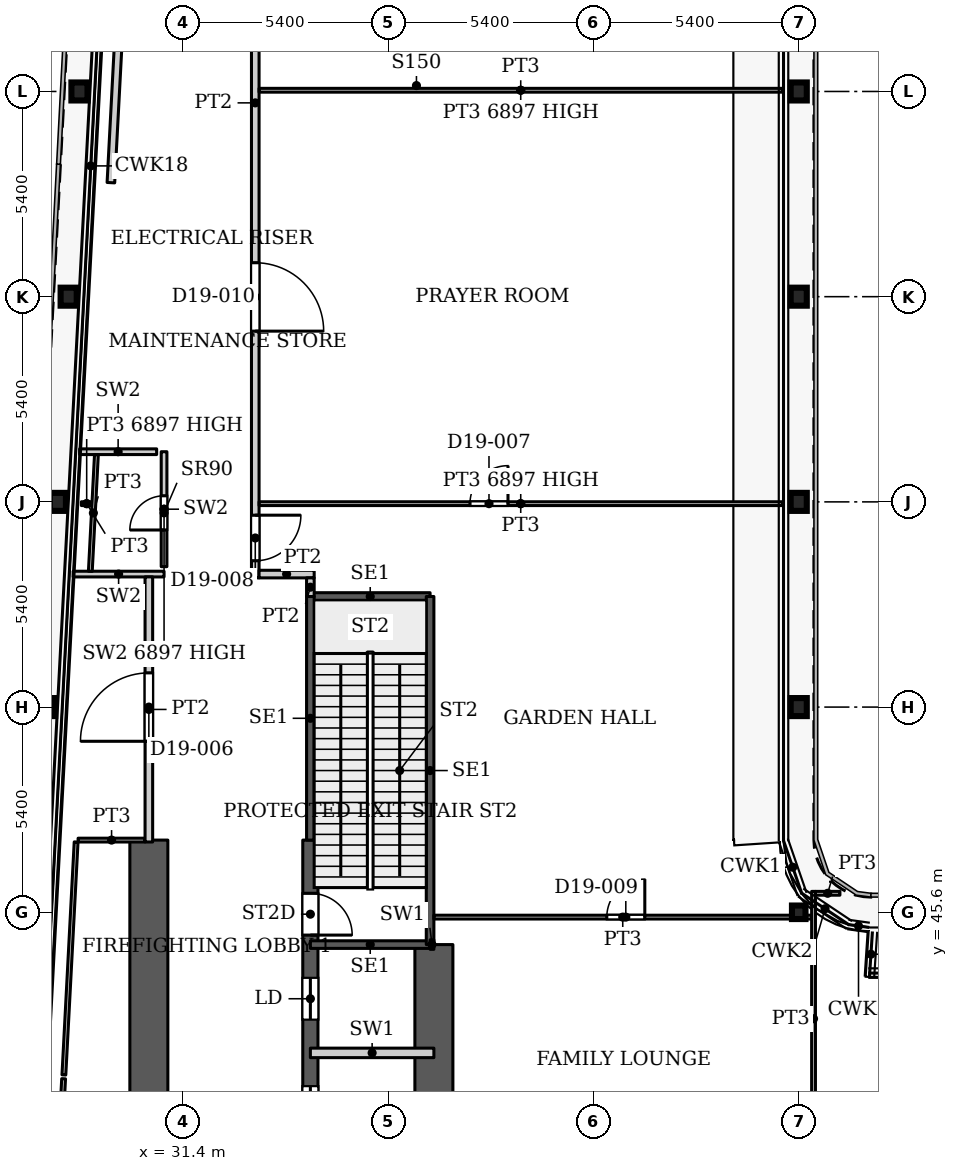
"""IFC4 building model, lengths in metres.
Left out: names, types, materials, properties, quantities, classifications, styles, units other than length and angle.
Written with IfcOpenShell. Run it as: python <this file> out.ifc"""

import sys

from ifc_helpers import new_model, si_unit, direction, frame, frame_2d, origin, origin_2d, place, context, subcontext, project, spatial, rectangle, hollow_rectangle, i_section, extrude, source, transform, mapped, element, fill, save


model = new_model("IFC4")
c1 = context("Model", 3, precision=1e-05, world=origin(), true_north=direction((0.0, 1.0)))
c2 = subcontext(c1, "Body", "Model", "MODEL_VIEW")
j1 = project(units=[si_unit("LENGTHUNIT", "METRE"), si_unit("PLANEANGLEUNIT", "RADIAN")], contexts=[c1])
p1 = place(None, origin())
s1 = spatial("IfcSite", under=j1, at=p1, CompositionType="ELEMENT")
p2 = place(p1, origin())
s2 = spatial("IfcBuilding", under=s1, at=p2, CompositionType="ELEMENT")
p3 = place(p2, frame((0.0, 0.0, 81.2)))
s3 = spatial("IfcBuildingStorey", under=s2, at=p3, CompositionType="ELEMENT", Elevation=81.2)
for number, where, z_axis, x_axis in (
    (1, (27.822, 51.0, 0.0), (0.0, 0.0, 1.0), (1.0, 0.0, 0.0)),
    (2, (47.6, 51.0, 0.0), (0.0, 0.0, 1.0), (1.0, 0.0, 0.0)),
    (3, (28.106, 56.4, 0.0), (0.0, 0.0, 1.0), (1.0, 0.0, 0.0)),
    (4, (47.6, 56.4, 0.0), (0.0, 0.0, 1.0), (1.0, 0.0, 0.0)),
    (5, (28.39, 61.8, 0.0), (0.0, 0.0, 1.0), (1.0, 0.0, 0.0)),
    (6, (47.6, 61.8, 0.0), (0.0, 0.0, 1.0), (1.0, 0.0, 0.0)),
    (7, (28.674, 67.2, 0.0), (0.0, 0.0, 1.0), (1.0, 0.0, 0.0)),
    (8, (47.6, 67.2, 0.0), (0.0, 0.0, 1.0), (1.0, 0.0, 0.0)),
):
    element("IfcColumn", number, at=place(p3, frame(where, z_axis=z_axis, x_axis=x_axis)), inside=s3, PredefinedType="COLUMN", context=c2, shape_type="SweptSolid", body=[
        extrude(i_section(OverallWidth=0.424, OverallDepth=0.474, WebThickness=0.048, FlangeThickness=0.077, FilletRadius=0.014, at=origin_2d()), origin(), (0.0, 0.0, 1.0), 7.8),
    ])
p4 = place(p3, frame((47.6, 45.6, 0.0), z_axis=(0.0, 0.0, 1.0), x_axis=(1.0, 0.0, 0.0)))
e9 = element("IfcColumn", 9, at=p4, inside=s3, PredefinedType="COLUMN", context=c2, shape_type="SweptSolid", body=[
    extrude(hollow_rectangle(XDim=0.356, YDim=0.356, WallThickness=0.016, InnerFilletRadius=0.016, OuterFilletRadius=0.032, at=origin_2d()), origin(), (0.0, 0.0, 1.0), 7.8),
])
p5 = place(p3, frame((34.75, 29.05, 0.0), z_axis=(0.0, 0.0, 1.0), x_axis=(0.0, 1.0, 0.0)))
e10 = element("IfcWall", 10, at=p5, inside=s3, PredefinedType="SHEAR", context=c2, shape_type="SweptSolid", body=[
    extrude(rectangle(XDim=18.45, YDim=0.4, at=frame_2d((9.225, 0.0))), origin(), (0.0, 0.0, 1.0), 7.8),
])
p6 = place(p5, frame((8.025, 0.0, 0.0)))
e11 = element("IfcOpeningElement", 11, at=p6, cuts=e10, PredefinedType="OPENING", context=c2, shape_type="SweptSolid", body=[
    extrude(rectangle(XDim=1.1, YDim=2.2, at=frame_2d((0.55, 1.1))), frame((0.0, 0.21, 0.0), z_axis=(0.0, -1.0, 0.0), x_axis=(1.0, 0.0, 0.0)), (0.0, 0.0, 1.0), 0.42),
])
p7 = place(p5, frame((10.875, 0.0, 0.0)))
e12 = element("IfcOpeningElement", 12, at=p7, cuts=e10, PredefinedType="OPENING", context=c2, shape_type="SweptSolid", body=[
    extrude(rectangle(XDim=1.1, YDim=2.2, at=frame_2d((0.55, 1.1))), frame((0.0, 0.21, 0.0), z_axis=(0.0, -1.0, 0.0), x_axis=(1.0, 0.0, 0.0)), (0.0, 0.0, 1.0), 0.42),
])
p8 = place(p5, frame((13.725, 0.0, 0.0)))
e13 = element("IfcOpeningElement", 13, at=p8, cuts=e10, PredefinedType="OPENING", context=c2, shape_type="SweptSolid", body=[
    extrude(rectangle(XDim=1.1, YDim=2.2, at=frame_2d((0.55, 1.1))), frame((0.0, 0.21, 0.0), z_axis=(0.0, -1.0, 0.0), x_axis=(1.0, 0.0, 0.0)), (0.0, 0.0, 1.0), 0.42),
])
p9 = place(p5, frame((15.95, 0.0, 0.0)))
e14 = element("IfcOpeningElement", 14, at=p9, cuts=e10, PredefinedType="OPENING", context=c2, shape_type="SweptSolid", body=[
    extrude(rectangle(XDim=1.1, YDim=2.2, at=frame_2d((0.55, 1.1))), frame((0.0, 0.21, 0.0), z_axis=(0.0, -1.0, 0.0), x_axis=(1.0, 0.0, 0.0)), (0.0, 0.0, 1.0), 0.42),
])
p10 = place(p3, frame((38.0, 36.2, 0.0), z_axis=(0.0, 0.0, 1.0), x_axis=(0.0, 1.0, 0.0)))
e15 = element("IfcWall", 15, at=p10, inside=s3, PredefinedType="SHEAR", context=c2, shape_type="SweptSolid", body=[
    extrude(rectangle(XDim=8.55, YDim=1.0, at=frame_2d((4.275, 0.0))), origin(), (0.0, 0.0, 1.0), 7.8),
])
p11 = place(p3, frame((30.5, 29.05, 0.0), z_axis=(0.0, 0.0, 1.0), x_axis=(0.0, 1.0, 0.0)))
e16 = element("IfcWall", 16, at=p11, inside=s3, PredefinedType="SHEAR", context=c2, shape_type="SweptSolid", body=[
    extrude(rectangle(XDim=18.45, YDim=1.0, at=frame_2d((9.225, 0.0))), origin(), (0.0, 0.0, 1.0), 7.8),
])
p12 = place(p11, frame((1.5, 0.0, 0.0)))
e17 = element("IfcOpeningElement", 17, at=p12, cuts=e16, PredefinedType="OPENING", context=c2, shape_type="SweptSolid", body=[
    extrude(rectangle(XDim=0.9, YDim=2.2, at=frame_2d((0.45, 1.1))), frame((0.0, 0.51, 0.0), z_axis=(0.0, -1.0, 0.0), x_axis=(1.0, 0.0, 0.0)), (0.0, 0.0, 1.0), 1.02),
])
p13 = place(p11, frame((8.146, 0.0, 0.0)))
e18 = element("IfcOpeningElement", 18, at=p13, cuts=e16, PredefinedType="OPENING", context=c2, shape_type="SweptSolid", body=[
    extrude(rectangle(XDim=0.9, YDim=2.2, at=frame_2d((0.45, 1.1))), frame((0.0, 0.51, 0.0), z_axis=(0.0, -1.0, 0.0), x_axis=(1.0, 0.0, 0.0)), (0.0, 0.0, 1.0), 1.02),
])
for number, where, z_axis, x_axis in (
    (19, (34.75, 44.75, 0.0), (0.0, 0.0, 1.0), (1.0, 0.0, 0.0)),
    (20, (34.75, 53.91, 0.0), (0.0, 0.0, 1.0), (1.0, 0.0, 0.0)),
):
    element("IfcWall", number, at=place(p3, frame(where, z_axis=z_axis, x_axis=x_axis)), inside=s3, PredefinedType="SHEAR", context=c2, shape_type="SweptSolid", body=[
        extrude(rectangle(XDim=3.15, YDim=0.2, at=frame_2d((1.575, 0.0))), origin(), (0.0, 0.0, 1.0), 7.8),
    ])
p14 = place(p3, frame((34.75, 47.5, 0.0), z_axis=(0.0, 0.0, 1.0), x_axis=(0.0, 1.0, 0.0)))
e21 = element("IfcWall", 21, at=p14, inside=s3, PredefinedType="SHEAR", context=c2, shape_type="SweptSolid", body=[
    extrude(rectangle(XDim=6.41, YDim=0.2, at=frame_2d((3.205, 0.0))), origin(), (0.0, 0.0, 1.0), 7.8),
])
p15 = place(p3, frame((37.9, 44.75, 0.0), z_axis=(0.0, 0.0, 1.0), x_axis=(0.0, 1.0, 0.0)))
e22 = element("IfcWall", 22, at=p15, inside=s3, PredefinedType="SHEAR", context=c2, shape_type="SweptSolid", body=[
    extrude(rectangle(XDim=9.16, YDim=0.2, at=frame_2d((4.58, 0.0))), origin(), (0.0, 0.0, 1.0), 7.8),
])
p16 = place(p3, frame((34.75, 41.9, 0.0), z_axis=(0.0, 0.0, 1.0), x_axis=(1.0, 0.0, 0.0)))
e23 = element("IfcWall", 23, at=p16, inside=s3, PredefinedType="PARTITIONING", context=c2, shape_type="SweptSolid", body=[
    extrude(rectangle(XDim=3.25, YDim=0.25, at=frame_2d((1.625, 0.0))), origin(), (0.0, 0.0, 1.0), 7.8),
])
p17 = place(p3, frame((37.9, 44.75, 0.0), z_axis=(0.0, 0.0, 1.0), x_axis=(1.0, 0.0, 0.0)))
e24 = element("IfcWall", 24, at=p17, inside=s3, PredefinedType="PARTITIONING", context=c2, shape_type="SweptSolid", body=[
    extrude(rectangle(XDim=0.1, YDim=0.25, at=frame_2d((0.05, 0.0))), origin(), (0.0, 0.0, 1.0), 7.8),
])
p18 = place(p3, frame((28.508, 54.5, 0.0), z_axis=(0.0, 0.0, 1.0), x_axis=(1.0, 0.0, 0.0)))
e25 = element("IfcWall", 25, at=p18, inside=s3, PredefinedType="PARTITIONING", context=c2, shape_type="SweptSolid", body=[
    extrude(rectangle(XDim=2.392, YDim=0.15, at=frame_2d((1.196, 0.0))), origin(), (0.0, 0.0, 1.0), 7.8),
])
p19 = place(p3, frame((30.9, 54.695, 0.0), z_axis=(0.0, 0.0, 1.0), x_axis=(0.0, 1.0, 0.0)))
e26 = element("IfcWall", 26, at=p19, inside=s3, PredefinedType="PARTITIONING", context=c2, shape_type="SweptSolid", body=[
    extrude(rectangle(XDim=3.025, YDim=0.15, at=frame_2d((1.512, 0.0))), origin(), (0.0, 0.0, 1.0), 6.897),
])
p20 = place(p19, frame((0.965, 0.0, 0.0)))
e27 = element("IfcOpeningElement", 27, at=p20, cuts=e26, PredefinedType="OPENING", context=c2, shape_type="SweptSolid", body=[
    extrude(rectangle(XDim=0.9, YDim=2.2, at=frame_2d((0.45, 1.1))), frame((0.0, 0.085, 0.0), z_axis=(0.0, -1.0, 0.0), x_axis=(1.0, 0.0, 0.0)), (0.0, 0.0, 1.0), 0.17),
])
p21 = place(p3, frame((28.678, 57.72, 0.0), z_axis=(0.0, 0.0, 1.0), x_axis=(1.0, 0.0, 0.0)))
e28 = element("IfcWall", 28, at=p21, inside=s3, PredefinedType="PARTITIONING", context=c2, shape_type="SweptSolid", body=[
    extrude(rectangle(XDim=2.027, YDim=0.15, at=frame_2d((1.014, 0.0))), origin(), (0.0, 0.0, 1.0), 7.8),
])
p22 = place(p3, frame((27.845, 33.393, 0.0), z_axis=(0.0, 0.0, 1.0), x_axis=(0.052580086943, 0.998616710484, 0.0)))
e29 = element("IfcWall", 29, at=p22, inside=s3, PredefinedType="PARTITIONING", context=c2, shape_type="SweptSolid", body=[
    extrude(rectangle(XDim=7.838, YDim=0.1, at=frame_2d((3.919, 0.0))), origin(), (0.0, 0.0, 1.0), 7.5),
])
p23 = place(p3, frame((28.264, 41.32, 0.0), z_axis=(0.0, 0.0, 1.0), x_axis=(0.052460718565, 0.998622988423, 0.0)))
e30 = element("IfcWall", 30, at=p23, inside=s3, PredefinedType="PARTITIONING", context=c2, shape_type="SweptSolid", body=[
    extrude(rectangle(XDim=6.138, YDim=0.1, at=frame_2d((3.069, 0.0))), origin(), (0.0, 0.0, 1.0), 7.5),
])
p24 = place(p3, frame((28.638, 47.5, 0.0), z_axis=(0.0, 0.0, 1.0), x_axis=(1.0, 0.0, 0.0)))
e31 = element("IfcWall", 31, at=p24, inside=s3, PredefinedType="PARTITIONING", context=c2, shape_type="SweptSolid", body=[
    extrude(rectangle(XDim=1.762, YDim=0.1, at=frame_2d((0.881, 0.0))), origin(), (0.0, 0.0, 1.0), 7.5),
])
p25 = place(p3, frame((28.724, 56.353, 0.0), z_axis=(0.0, 0.0, 1.0), x_axis=(1.0, 0.0, 0.0)))
e32 = element("IfcWall", 32, at=p25, inside=s3, PredefinedType="PARTITIONING", context=c2, shape_type="SweptSolid", body=[
    extrude(rectangle(XDim=0.28, YDim=0.1, at=frame_2d((0.14, 0.0))), origin(), (0.0, 0.0, 1.0), 6.897),
])
p26 = place(p3, frame((28.96, 54.574, 0.0), z_axis=(0.0, 0.0, 1.0), x_axis=(0.052145785312, 0.998639483034, 0.0)))
e33 = element("IfcWall", 33, at=p26, inside=s3, PredefinedType="PARTITIONING", context=c2, shape_type="SweptSolid", body=[
    extrude(rectangle(XDim=3.071, YDim=0.1, at=frame_2d((1.536, 0.0))), origin(), (0.0, 0.0, 1.0), 7.5),
])
p27 = place(p3, frame((29.501, 64.8, 0.0), z_axis=(0.0, 0.0, 1.0), x_axis=(0.052619165502, 0.998614652117, 0.0)))
e34 = element("IfcWall", 34, at=p27, inside=s3, PredefinedType="PARTITIONING", context=c2, shape_type="SweptSolid", body=[
    extrude(rectangle(XDim=26.549, YDim=0.2, at=frame_2d((13.274, 0.0))), origin(), (0.0, 0.0, 1.0), 7.5),
])
p28 = place(p3, frame((30.5, 47.45, 0.0), z_axis=(0.0, 0.0, 1.0), x_axis=(0.0, 1.0, 0.0)))
e35 = element("IfcWall", 35, at=p28, inside=s3, PredefinedType="PARTITIONING", context=c2, shape_type="SweptSolid", body=[
    extrude(rectangle(XDim=6.976, YDim=0.2, at=frame_2d((3.488, 0.0))), origin(), (0.0, 0.0, 1.0), 7.5),
])
p29 = place(p28, frame((2.65, 0.0, 0.0)))
e36 = element("IfcOpeningElement", 36, at=p29, cuts=e35, PredefinedType="OPENING", context=c2, shape_type="SweptSolid", body=[
    extrude(rectangle(XDim=1.8, YDim=2.1, at=frame_2d((0.9, 1.05))), frame((0.0, 0.11, 0.0), z_axis=(0.0, -1.0, 0.0), x_axis=(1.0, 0.0, 0.0)), (0.0, 0.0, 1.0), 0.22),
])
p30 = place(p3, frame((33.3, 54.4, 0.0), z_axis=(0.0, 0.0, 1.0), x_axis=(0.0, 1.0, 0.0)))
e37 = element("IfcWall", 37, at=p30, inside=s3, PredefinedType="PARTITIONING", context=c2, shape_type="SweptSolid", body=[
    extrude(rectangle(XDim=25.0, YDim=0.2, at=frame_2d((12.5, 0.0))), origin(), (0.0, 0.0, 1.0), 7.5),
])
p31 = place(p30, frame((0.45, 0.0, 0.0)))
e38 = element("IfcOpeningElement", 38, at=p31, cuts=e37, PredefinedType="OPENING", context=c2, shape_type="SweptSolid", body=[
    extrude(rectangle(XDim=1.2, YDim=2.1, at=frame_2d((0.6, 1.05))), frame((0.0, 0.11, 0.0), z_axis=(0.0, -1.0, 0.0), x_axis=(1.0, 0.0, 0.0)), (0.0, 0.0, 1.0), 0.22),
])
p32 = place(p30, frame((6.493, 0.0, 0.0)))
e39 = element("IfcOpeningElement", 39, at=p32, cuts=e37, PredefinedType="OPENING", context=c2, shape_type="SweptSolid", body=[
    extrude(rectangle(XDim=1.8, YDim=2.1, at=frame_2d((0.9, 1.05))), frame((0.0, 0.11, 0.0), z_axis=(0.0, -1.0, 0.0), x_axis=(1.0, 0.0, 0.0)), (0.0, 0.0, 1.0), 0.22),
])
p33 = place(p30, frame((17.372, 0.0, 0.0)))
e40 = element("IfcOpeningElement", 40, at=p33, cuts=e37, PredefinedType="OPENING", context=c2, shape_type="SweptSolid", body=[
    extrude(rectangle(XDim=1.8, YDim=2.1, at=frame_2d((0.9, 1.05))), frame((0.0, 0.11, 0.0), z_axis=(0.0, -1.0, 0.0), x_axis=(1.0, 0.0, 0.0)), (0.0, 0.0, 1.0), 0.22),
])
p34 = place(p30, frame((23.912, 0.0, 0.0)))
e41 = element("IfcOpeningElement", 41, at=p34, cuts=e37, PredefinedType="OPENING", context=c2, shape_type="SweptSolid", body=[
    extrude(rectangle(XDim=0.9, YDim=2.1, at=frame_2d((0.45, 1.05))), frame((0.0, 0.11, 0.0), z_axis=(0.0, -1.0, 0.0), x_axis=(1.0, 0.0, 0.0)), (0.0, 0.0, 1.0), 0.22),
])
p35 = place(p3, frame((33.4, 54.5, 0.0), z_axis=(0.0, 0.0, 1.0), x_axis=(1.0, 0.0, 0.0)))
e42 = element("IfcWall", 42, at=p35, inside=s3, PredefinedType="PARTITIONING", context=c2, shape_type="SweptSolid", body=[
    extrude(rectangle(XDim=1.45, YDim=0.2, at=frame_2d((0.725, 0.0))), origin(), (0.0, 0.0, 1.0), 7.5),
])
p36 = place(p3, frame((33.4, 56.353, 0.0), z_axis=(0.0, 0.0, 1.0), x_axis=(1.0, 0.0, 0.0)))
e43 = element("IfcWall", 43, at=p36, inside=s3, PredefinedType="PARTITIONING", context=c2, shape_type="SweptSolid", body=[
    extrude(rectangle(XDim=13.77, YDim=0.1, at=frame_2d((6.885, 0.0))), origin(), (0.0, 0.0, 1.0), 6.897),
])
p37 = place(p36, frame((5.55, 0.0, 0.0)))
e44 = element("IfcOpeningElement", 44, at=p37, cuts=e43, PredefinedType="OPENING", context=c2, shape_type="SweptSolid", body=[
    extrude(rectangle(XDim=1.0, YDim=2.1, at=frame_2d((0.5, 1.05))), frame((0.0, 0.06, 0.0), z_axis=(0.0, -1.0, 0.0), x_axis=(1.0, 0.0, 0.0)), (0.0, 0.0, 1.0), 0.12),
])
p38 = place(p3, frame((33.4, 67.232, 0.0), z_axis=(0.0, 0.0, 1.0), x_axis=(1.0, 0.0, 0.0)))
e45 = element("IfcWall", 45, at=p38, inside=s3, PredefinedType="PARTITIONING", context=c2, shape_type="SweptSolid", body=[
    extrude(rectangle(XDim=13.77, YDim=0.1, at=frame_2d((6.885, 0.0))), origin(), (0.0, 0.0, 1.0), 6.897),
])
p39 = place(p3, frame((34.75, 53.91, 0.0), z_axis=(0.0, 0.0, 1.0), x_axis=(0.0, 1.0, 0.0)))
e46 = element("IfcWall", 46, at=p39, inside=s3, PredefinedType="PARTITIONING", context=c2, shape_type="SweptSolid", body=[
    extrude(rectangle(XDim=0.49, YDim=0.2, at=frame_2d((0.245, 0.0))), origin(), (0.0, 0.0, 1.0), 7.5),
])
p40 = place(p3, frame((37.999, 45.473, 0.0), z_axis=(0.0, 0.0, 1.0), x_axis=(1.0, 0.0, 0.0)))
e47 = element("IfcWall", 47, at=p40, inside=s3, PredefinedType="PARTITIONING", context=c2, shape_type="SweptSolid", body=[
    extrude(rectangle(XDim=9.941, YDim=0.1, at=frame_2d((4.97, 0.0))), origin(), (0.0, 0.0, 1.0), 7.5),
])
p41 = place(p40, frame((4.551, 0.0, 0.0)))
e48 = element("IfcOpeningElement", 48, at=p41, cuts=e47, PredefinedType="OPENING", context=c2, shape_type="SweptSolid", body=[
    extrude(rectangle(XDim=1.0, YDim=2.1, at=frame_2d((0.5, 1.05))), frame((0.0, 0.06, 0.0), z_axis=(0.0, -1.0, 0.0), x_axis=(1.0, 0.0, 0.0)), (0.0, 0.0, 1.0), 0.12),
])
p42 = place(p3, frame((47.99, 39.449, 0.0), z_axis=(0.0, 0.0, 1.0), x_axis=(0.0, 1.0, 0.0)))
e49 = element("IfcWall", 49, at=p42, inside=s3, PredefinedType="PARTITIONING", context=c2, shape_type="SweptSolid", body=[
    extrude(rectangle(XDim=6.701, YDim=0.1, at=frame_2d((3.351, 0.0))), origin(), (0.0, 0.0, 1.0), 7.5),
])
p43 = place(p3, frame((48.04, 46.1, 0.0), z_axis=(0.0, 0.0, 1.0), x_axis=(1.0, 0.0, 0.0)))
e50 = element("IfcWall", 50, at=p43, inside=s3, PredefinedType="PARTITIONING", context=c2, shape_type="SweptSolid", body=[
    extrude(rectangle(XDim=0.644, YDim=0.1, at=frame_2d((0.322, 0.0))), origin(), (0.0, 0.0, 1.0), 7.5),
])
m1 = source(origin(), c2, "Body", "SweptSolid", [
    extrude(rectangle(XDim=1.1, YDim=2.2, at=frame_2d((0.55, 1.1))), frame((0.0, 0.025, 0.0), z_axis=(0.0, -1.0, 0.0), x_axis=(1.0, 0.0, 0.0)), (0.0, 0.0, 1.0), 0.05),
])
p44 = place(p7, origin())
e51 = element("IfcDoor", 51, at=p44, inside=s3, OperationType="SLIDING_TO_LEFT", PredefinedType="DOOR", context=c2, shape_type="MappedRepresentation", body=[
    mapped(m1, transform((0.0, 0.0, 0.0), x_axis=(1.0, 0.0, 0.0), y_axis=(0.0, 1.0, 0.0), z_axis=(0.0, 0.0, 1.0), scale=1.0)),
])
fill(e12, e51)
p45 = place(p8, origin())
e52 = element("IfcDoor", 52, at=p45, inside=s3, OperationType="SLIDING_TO_LEFT", PredefinedType="DOOR", context=c2, shape_type="MappedRepresentation", body=[
    mapped(m1, transform((0.0, 0.0, 0.0), x_axis=(1.0, 0.0, 0.0), y_axis=(0.0, 1.0, 0.0), z_axis=(0.0, 0.0, 1.0), scale=1.0)),
])
fill(e13, e52)
m2 = source(origin(), c2, "Body", "SweptSolid", [
    extrude(rectangle(XDim=0.9, YDim=2.2, at=frame_2d((0.45, 1.1))), frame((0.0, 0.025, 0.0), z_axis=(0.0, -1.0, 0.0), x_axis=(1.0, 0.0, 0.0)), (0.0, 0.0, 1.0), 0.05),
])
p46 = place(p20, origin())
e53 = element("IfcDoor", 53, at=p46, inside=s3, OperationType="SINGLE_SWING_LEFT", PredefinedType="DOOR", context=c2, shape_type="MappedRepresentation", body=[
    mapped(m2, transform((0.0, 0.0, 0.0), x_axis=(1.0, 0.0, 0.0), y_axis=(0.0, 1.0, 0.0), z_axis=(0.0, 0.0, 1.0), scale=1.0)),
])
fill(e27, e53)
m3 = source(origin(), c2, "Body", "SweptSolid", [
    extrude(rectangle(XDim=1.1, YDim=2.2, at=frame_2d((0.55, 1.1))), frame((0.0, 0.025, 0.0), z_axis=(0.0, -1.0, 0.0), x_axis=(1.0, 0.0, 0.0)), (0.0, 0.0, 1.0), 0.05),
])
p47 = place(p9, origin())
e54 = element("IfcDoor", 54, at=p47, inside=s3, OperationType="SINGLE_SWING_RIGHT", PredefinedType="DOOR", context=c2, shape_type="MappedRepresentation", body=[
    mapped(m3, transform((0.0, 0.0, 0.0), x_axis=(1.0, 0.0, 0.0), y_axis=(0.0, 1.0, 0.0), z_axis=(0.0, 0.0, 1.0), scale=1.0)),
])
fill(e14, e54)
m4 = source(origin(), c2, "Body", "SweptSolid", [
    extrude(rectangle(XDim=1.8, YDim=2.1, at=frame_2d((0.9, 1.05))), frame((0.0, 0.025, 0.0), z_axis=(0.0, -1.0, 0.0), x_axis=(1.0, 0.0, 0.0)), (0.0, 0.0, 1.0), 0.05),
])
p48 = place(p29, origin())
e55 = element("IfcDoor", 55, at=p48, inside=s3, OperationType="DOUBLE_DOOR_SINGLE_SWING", PredefinedType="DOOR", context=c2, shape_type="MappedRepresentation", body=[
    mapped(m4, transform((0.0, 0.0, 0.0), x_axis=(1.0, 0.0, 0.0), y_axis=(0.0, 1.0, 0.0), z_axis=(0.0, 0.0, 1.0), scale=1.0)),
])
fill(e36, e55)
m5 = source(origin(), c2, "Body", "SweptSolid", [
    extrude(rectangle(XDim=1.0, YDim=2.1, at=frame_2d((0.5, 1.05))), frame((0.0, 0.025, 0.0), z_axis=(0.0, -1.0, 0.0), x_axis=(1.0, 0.0, 0.0)), (0.0, 0.0, 1.0), 0.05),
])
p49 = place(p37, origin())
e56 = element("IfcDoor", 56, at=p49, inside=s3, OperationType="SINGLE_SWING_LEFT", PredefinedType="DOOR", context=c2, shape_type="MappedRepresentation", body=[
    mapped(m5, transform((0.0, 0.0, 0.0), x_axis=(1.0, 0.0, 0.0), y_axis=(0.0, 1.0, 0.0), z_axis=(0.0, 0.0, 1.0), scale=1.0)),
])
fill(e44, e56)
m6 = source(origin(), c2, "Body", "SweptSolid", [
    extrude(rectangle(XDim=1.2, YDim=2.1, at=frame_2d((0.6, 1.05))), frame((0.0, 0.025, 0.0), z_axis=(0.0, -1.0, 0.0), x_axis=(1.0, 0.0, 0.0)), (0.0, 0.0, 1.0), 0.05),
])
p50 = place(p31, origin())
e57 = element("IfcDoor", 57, at=p50, inside=s3, OperationType="SINGLE_SWING_RIGHT", PredefinedType="DOOR", context=c2, shape_type="MappedRepresentation", body=[
    mapped(m6, transform((0.0, 0.0, 0.0), x_axis=(1.0, 0.0, 0.0), y_axis=(0.0, 1.0, 0.0), z_axis=(0.0, 0.0, 1.0), scale=1.0)),
])
fill(e38, e57)
p51 = place(p41, origin())
e58 = element("IfcDoor", 58, at=p51, inside=s3, OperationType="SINGLE_SWING_LEFT", PredefinedType="DOOR", context=c2, shape_type="MappedRepresentation", body=[
    mapped(m5, transform((0.0, 0.0, 0.0), x_axis=(1.0, 0.0, 0.0), y_axis=(0.0, 1.0, 0.0), z_axis=(0.0, 0.0, 1.0), scale=1.0)),
])
fill(e48, e58)
p52 = place(p32, origin())
e59 = element("IfcDoor", 59, at=p52, inside=s3, OperationType="DOUBLE_DOOR_SINGLE_SWING", PredefinedType="DOOR", context=c2, shape_type="MappedRepresentation", body=[
    mapped(m4, transform((0.0, 0.0, 0.0), x_axis=(1.0, 0.0, 0.0), y_axis=(0.0, 1.0, 0.0), z_axis=(0.0, 0.0, 1.0), scale=1.0)),
])
fill(e39, e59)
save(model, sys.argv[1])
